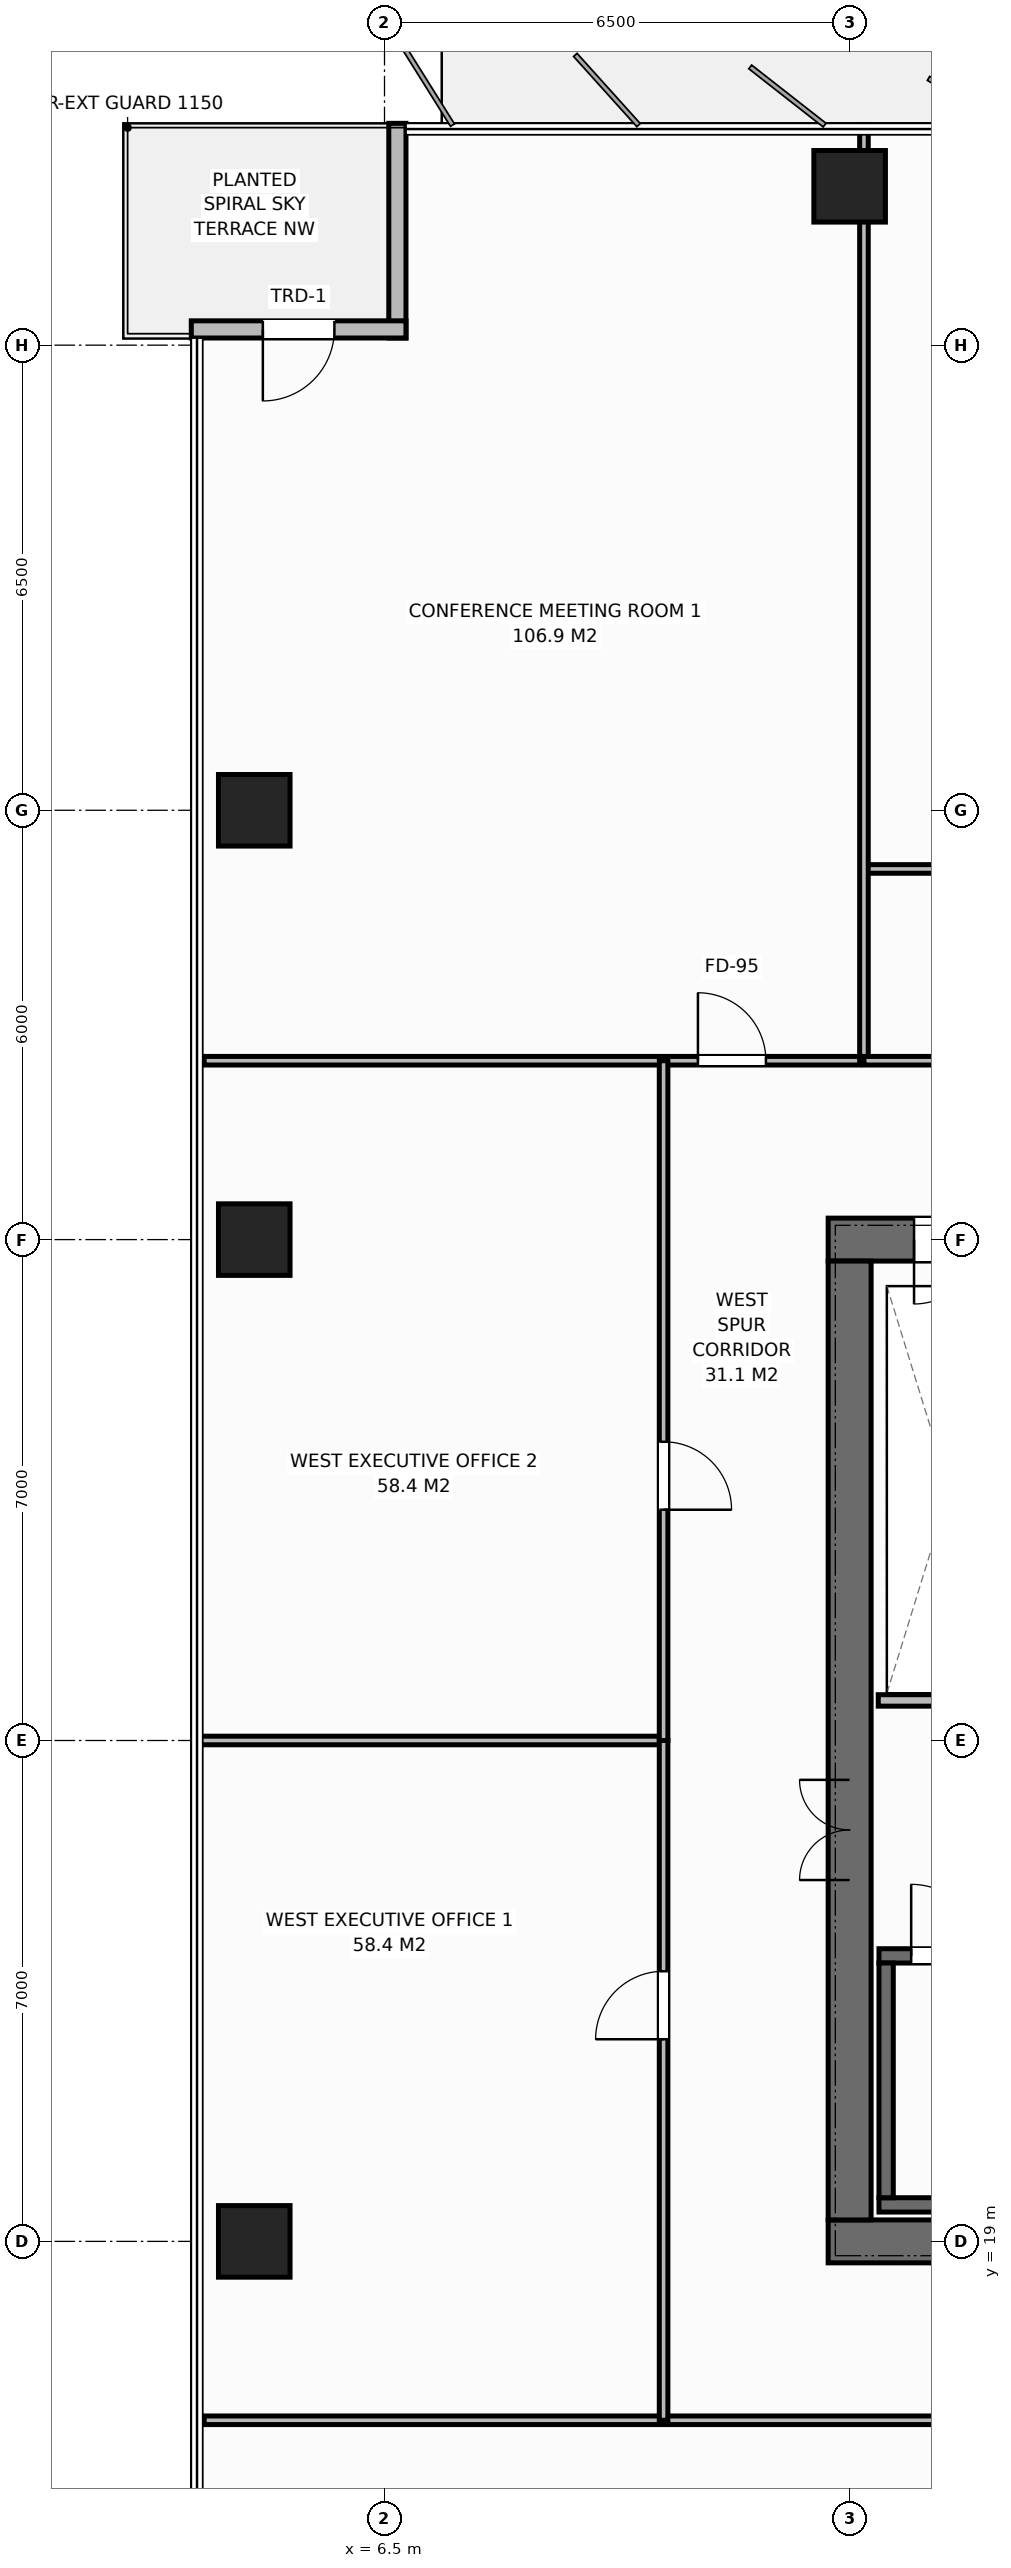
"""IFC4 building model, lengths in metres.
Left out: names, types, materials, properties, quantities, classifications, styles, units other than length and angle.
Written with IfcOpenShell. Run it as: python <this file> out.ifc"""

import sys

from ifc_helpers import new_model, si_unit, direction, frame, frame_2d, origin, origin_2d, place, context, subcontext, project, spatial, rectangle, extrude, element, fill, save


model = new_model("IFC4")
c1 = context("Model", 3, precision=1e-05, world=origin(), true_north=direction((0.0, 1.0)))
c2 = subcontext(c1, "Body", "Model", "MODEL_VIEW")
j1 = project(units=[si_unit("LENGTHUNIT", "METRE"), si_unit("PLANEANGLEUNIT", "RADIAN")], contexts=[c1])
p1 = place(None, origin())
s1 = spatial("IfcSite", under=j1, at=p1, CompositionType="ELEMENT")
p2 = place(p1, origin())
s2 = spatial("IfcBuilding", under=s1, at=p2, CompositionType="ELEMENT")
p3 = place(p2, frame((0.0, 0.0, 144.2)))
s3 = spatial("IfcBuildingStorey", under=s2, at=p3, CompositionType="ELEMENT", Elevation=144.2)
p4 = place(p3, frame((12.7, 19.0, 0.0), z_axis=(0.0, 0.0, 1.0), x_axis=(1.0, 0.0, 0.0)))
e1 = element("IfcWall", 1, at=p4, inside=s3, PredefinedType="SHEAR", context=c2, shape_type="SweptSolid", body=[
    extrude(rectangle(XDim=13.6, YDim=0.6, at=frame_2d((6.8, 0.0))), origin(), (0.0, 0.0, 1.0), 3.8),
])
p5 = place(p4, frame((9.18, 0.0, 0.0)))
e2 = element("IfcOpeningElement", 2, at=p5, cuts=e1, PredefinedType="OPENING", context=c2, shape_type="SweptSolid", body=[
    extrude(rectangle(XDim=1.4, YDim=2.2, at=frame_2d((0.7, 1.1))), frame((0.0, 0.31, 0.0), z_axis=(0.0, -1.0, 0.0), x_axis=(1.0, 0.0, 0.0)), (0.0, 0.0, 1.0), 0.62),
])
p6 = place(p3, frame((12.7, 33.0, 0.0), z_axis=(0.0, 0.0, 1.0), x_axis=(1.0, 0.0, 0.0)))
e3 = element("IfcWall", 3, at=p6, inside=s3, PredefinedType="SHEAR", context=c2, shape_type="SweptSolid", body=[
    extrude(rectangle(XDim=13.6, YDim=0.6, at=frame_2d((6.8, 0.0))), origin(), (0.0, 0.0, 1.0), 3.8),
])
p7 = place(p6, frame((1.2, 0.0, 0.0)))
e4 = element("IfcOpeningElement", 4, at=p7, cuts=e3, PredefinedType="OPENING", context=c2, shape_type="SweptSolid", body=[
    extrude(rectangle(XDim=0.9, YDim=2.15, at=frame_2d((0.45, 1.075))), frame((0.0, 0.31, 0.0), z_axis=(0.0, -1.0, 0.0), x_axis=(1.0, 0.0, 0.0)), (0.0, 0.0, 1.0), 0.62),
])
p8 = place(p6, frame((3.1, 0.0, 0.0)))
e5 = element("IfcOpeningElement", 5, at=p8, cuts=e3, PredefinedType="OPENING", context=c2, shape_type="SweptSolid", body=[
    extrude(rectangle(XDim=0.9, YDim=2.15, at=frame_2d((0.45, 1.075))), frame((0.0, 0.31, 0.0), z_axis=(0.0, -1.0, 0.0), x_axis=(1.0, 0.0, 0.0)), (0.0, 0.0, 1.0), 0.62),
])
p9 = place(p6, frame((4.9, 0.0, 0.0)))
e6 = element("IfcOpeningElement", 6, at=p9, cuts=e3, PredefinedType="OPENING", context=c2, shape_type="SweptSolid", body=[
    extrude(rectangle(XDim=0.9, YDim=2.15, at=frame_2d((0.45, 1.075))), frame((0.0, 0.31, 0.0), z_axis=(0.0, -1.0, 0.0), x_axis=(1.0, 0.0, 0.0)), (0.0, 0.0, 1.0), 0.62),
])
p10 = place(p6, frame((6.8, 0.0, 0.0)))
e7 = element("IfcOpeningElement", 7, at=p10, cuts=e3, PredefinedType="OPENING", context=c2, shape_type="SweptSolid", body=[
    extrude(rectangle(XDim=0.9, YDim=2.15, at=frame_2d((0.45, 1.075))), frame((0.0, 0.31, 0.0), z_axis=(0.0, -1.0, 0.0), x_axis=(1.0, 0.0, 0.0)), (0.0, 0.0, 1.0), 0.62),
])
p11 = place(p6, frame((9.18, 0.0, 0.0)))
e8 = element("IfcOpeningElement", 8, at=p11, cuts=e3, PredefinedType="OPENING", context=c2, shape_type="SweptSolid", body=[
    extrude(rectangle(XDim=1.4, YDim=2.2, at=frame_2d((0.7, 1.1))), frame((0.0, 0.31, 0.0), z_axis=(0.0, -1.0, 0.0), x_axis=(1.0, 0.0, 0.0)), (0.0, 0.0, 1.0), 0.62),
])
p12 = place(p3, frame((13.0, 19.3, 0.0), z_axis=(0.0, 0.0, 1.0), x_axis=(0.0, 1.0, 0.0)))
e9 = element("IfcWall", 9, at=p12, inside=s3, PredefinedType="SHEAR", context=c2, shape_type="SweptSolid", body=[
    extrude(rectangle(XDim=13.4, YDim=0.6, at=frame_2d((6.7, 0.0))), origin(), (0.0, 0.0, 1.0), 3.8),
])
p13 = place(p12, frame((4.75, 0.0, 0.0)))
e10 = element("IfcOpeningElement", 10, at=p13, cuts=e9, PredefinedType="OPENING", context=c2, shape_type="SweptSolid", body=[
    extrude(rectangle(XDim=1.4, YDim=2.2, at=frame_2d((0.7, 1.1))), frame((0.0, 0.31, 0.0), z_axis=(0.0, -1.0, 0.0), x_axis=(1.0, 0.0, 0.0)), (0.0, 0.0, 1.0), 0.62),
])
p14 = place(p3, frame((13.41, 19.51, 0.0), z_axis=(0.0, 0.0, 1.0), x_axis=(1.0, 0.0, 0.0)))
e11 = element("IfcWall", 11, at=p14, inside=s3, PredefinedType="SHEAR", context=c2, shape_type="SweptSolid", body=[
    extrude(rectangle(XDim=8.43, YDim=0.2, at=frame_2d((4.215, 0.0))), origin(), (0.0, 0.0, 1.0), 3.8),
])
p15 = place(p3, frame((13.41, 22.99, 0.0), z_axis=(0.0, 0.0, 1.0), x_axis=(1.0, 0.0, 0.0)))
e12 = element("IfcWall", 12, at=p15, inside=s3, PredefinedType="SHEAR", context=c2, shape_type="SweptSolid", body=[
    extrude(rectangle(XDim=8.43, YDim=0.2, at=frame_2d((4.215, 0.0))), origin(), (0.0, 0.0, 1.0), 3.8),
])
p16 = place(p15, frame((0.45, 0.0, 0.0)))
e13 = element("IfcOpeningElement", 13, at=p16, cuts=e12, PredefinedType="OPENING", context=c2, shape_type="SweptSolid", body=[
    extrude(rectangle(XDim=1.0, YDim=2.15, at=frame_2d((0.5, 1.075))), frame((0.0, 0.11, 0.0), z_axis=(0.0, -1.0, 0.0), x_axis=(1.0, 0.0, 0.0)), (0.0, 0.0, 1.0), 0.22),
])
p17 = place(p3, frame((13.51, 19.61, 0.0), z_axis=(0.0, 0.0, 1.0), x_axis=(0.0, 1.0, 0.0)))
e14 = element("IfcWall", 14, at=p17, inside=s3, PredefinedType="SHEAR", context=c2, shape_type="SweptSolid", body=[
    extrude(rectangle(XDim=3.28, YDim=0.2, at=frame_2d((1.64, 0.0))), origin(), (0.0, 0.0, 1.0), 3.8),
])
for number, where, z_axis, x_axis in (
    (15, (13.0, 47.72, 0.0), (0.0, 0.0, 1.0), (1.0, 0.0, 0.0)),
    (16, (4.68, 19.0, 0.0), (0.0, 0.0, 1.0), (1.0, 0.0, 0.0)),
    (17, (4.68, 33.0, 0.0), (0.0, 0.0, 1.0), (1.0, 0.0, 0.0)),
    (18, (4.68, 39.0, 0.0), (0.0, 0.0, 1.0), (1.0, 0.0, 0.0)),
):
    element("IfcColumn", number, at=place(p3, frame(where, z_axis=z_axis, x_axis=x_axis)), inside=s3, PredefinedType="COLUMN", context=c2, shape_type="SweptSolid", body=[
        extrude(rectangle(XDim=1.0, YDim=1.0, at=origin_2d()), origin(), (0.0, 0.0, 1.0), 3.8),
    ])
p18 = place(p3, frame((6.68, 45.6, 0.0), z_axis=(0.0, 0.0, 1.0), x_axis=(0.0, 1.0, 0.0)))
e19 = element("IfcWall", 19, at=p18, inside=s3, PredefinedType="STANDARD", context=c2, shape_type="SweptSolid", body=[
    extrude(rectangle(XDim=3.0, YDim=0.24, at=frame_2d((1.5, 0.0))), origin(), (0.0, 0.0, 1.0), 3.572),
])
p19 = place(p3, frame((3.8, 45.72, 0.0), z_axis=(0.0, 0.0, 1.0), x_axis=(1.0, 0.0, 0.0)))
e20 = element("IfcWall", 20, at=p19, inside=s3, PredefinedType="STANDARD", context=c2, shape_type="SweptSolid", body=[
    extrude(rectangle(XDim=3.0, YDim=0.24, at=frame_2d((1.5, 0.0))), origin(), (0.0, 0.0, 1.0), 3.572),
])
p20 = place(p19, frame((1.0, 0.0, 0.0)))
e21 = element("IfcOpeningElement", 21, at=p20, cuts=e20, PredefinedType="OPENING", context=c2, shape_type="SweptSolid", body=[
    extrude(rectangle(XDim=1.0, YDim=2.2, at=frame_2d((0.5, 1.1))), frame((0.0, 0.13, 0.0), z_axis=(0.0, -1.0, 0.0), x_axis=(1.0, 0.0, 0.0)), (0.0, 0.0, 1.0), 0.26),
])
p21 = place(p3, frame((13.4, 26.56, 0.0), z_axis=(0.0, 0.0, 1.0), x_axis=(1.0, 0.0, 0.0)))
e22 = element("IfcWall", 22, at=p21, inside=s3, PredefinedType="STANDARD", context=c2, shape_type="SweptSolid", body=[
    extrude(rectangle(XDim=8.34, YDim=0.16, at=frame_2d((4.17, 0.0))), origin(), (0.0, 0.0, 1.0), 3.572),
])
p22 = place(p3, frame((13.2, 35.5, 0.0), z_axis=(0.0, 0.0, 1.0), x_axis=(1.0, 0.0, 0.0)))
e23 = element("IfcWall", 23, at=p22, inside=s3, PredefinedType="PARTITIONING", context=c2, shape_type="SweptSolid", body=[
    extrude(rectangle(XDim=13.16, YDim=0.12, at=frame_2d((6.58, 0.0))), origin(), (0.0, 0.0, 1.0), 3.572),
])
p23 = place(p22, frame((1.35, 0.0, 0.0)))
e24 = element("IfcOpeningElement", 24, at=p23, cuts=e23, PredefinedType="OPENING", context=c2, shape_type="SweptSolid", body=[
    extrude(rectangle(XDim=0.9, YDim=2.15, at=frame_2d((0.45, 1.075))), frame((0.0, 0.07, 0.0), z_axis=(0.0, -1.0, 0.0), x_axis=(1.0, 0.0, 0.0)), (0.0, 0.0, 1.0), 0.14),
])
p24 = place(p22, frame((4.05, 0.0, 0.0)))
e25 = element("IfcOpeningElement", 25, at=p24, cuts=e23, PredefinedType="OPENING", context=c2, shape_type="SweptSolid", body=[
    extrude(rectangle(XDim=0.9, YDim=2.15, at=frame_2d((0.45, 1.075))), frame((0.0, 0.07, 0.0), z_axis=(0.0, -1.0, 0.0), x_axis=(1.0, 0.0, 0.0)), (0.0, 0.0, 1.0), 0.14),
])
p25 = place(p22, frame((8.25, 0.0, 0.0)))
e26 = element("IfcOpeningElement", 26, at=p25, cuts=e23, PredefinedType="OPENING", context=c2, shape_type="SweptSolid", body=[
    extrude(rectangle(XDim=0.9, YDim=2.15, at=frame_2d((0.45, 1.075))), frame((0.0, 0.07, 0.0), z_axis=(0.0, -1.0, 0.0), x_axis=(1.0, 0.0, 0.0)), (0.0, 0.0, 1.0), 0.14),
])
p26 = place(p22, frame((11.0, 0.0, 0.0)))
e27 = element("IfcOpeningElement", 27, at=p26, cuts=e23, PredefinedType="OPENING", context=c2, shape_type="SweptSolid", body=[
    extrude(rectangle(XDim=0.95, YDim=2.15, at=frame_2d((0.475, 1.075))), frame((0.0, 0.07, 0.0), z_axis=(0.0, -1.0, 0.0), x_axis=(1.0, 0.0, 0.0)), (0.0, 0.0, 1.0), 0.14),
])
p27 = place(p3, frame((13.2, 38.18, 0.0), z_axis=(0.0, 0.0, 1.0), x_axis=(1.0, 0.0, 0.0)))
e28 = element("IfcWall", 28, at=p27, inside=s3, PredefinedType="PARTITIONING", context=c2, shape_type="SweptSolid", body=[
    extrude(rectangle(XDim=13.16, YDim=0.12, at=frame_2d((6.58, 0.0))), origin(), (0.0, 0.0, 1.0), 3.572),
])
p28 = place(p3, frame((13.2, 35.56, 0.0), z_axis=(0.0, 0.0, 1.0), x_axis=(0.0, 1.0, 0.0)))
e29 = element("IfcWall", 29, at=p28, inside=s3, PredefinedType="PARTITIONING", context=c2, shape_type="SweptSolid", body=[
    extrude(rectangle(XDim=13.02, YDim=0.12, at=frame_2d((6.51, 0.0))), origin(), (0.0, 0.0, 1.0), 3.022),
])
p29 = place(p3, frame((3.98, 35.5, 0.0), z_axis=(0.0, 0.0, 1.0), x_axis=(1.0, 0.0, 0.0)))
e30 = element("IfcWall", 30, at=p29, inside=s3, PredefinedType="PARTITIONING", context=c2, shape_type="SweptSolid", body=[
    extrude(rectangle(XDim=9.16, YDim=0.12, at=frame_2d((4.58, 0.0))), origin(), (0.0, 0.0, 1.0), 3.572),
])
p30 = place(p29, frame((6.9, 0.0, 0.0)))
e31 = element("IfcOpeningElement", 31, at=p30, cuts=e30, PredefinedType="OPENING", context=c2, shape_type="SweptSolid", body=[
    extrude(rectangle(XDim=0.95, YDim=2.15, at=frame_2d((0.475, 1.075))), frame((0.0, 0.07, 0.0), z_axis=(0.0, -1.0, 0.0), x_axis=(1.0, 0.0, 0.0)), (0.0, 0.0, 1.0), 0.14),
])
p31 = place(p3, frame((3.98, 16.5, 0.0), z_axis=(0.0, 0.0, 1.0), x_axis=(1.0, 0.0, 0.0)))
e32 = element("IfcWall", 32, at=p31, inside=s3, PredefinedType="PARTITIONING", context=c2, shape_type="SweptSolid", body=[
    extrude(rectangle(XDim=15.02, YDim=0.12, at=frame_2d((7.51, 0.0))), origin(), (0.0, 0.0, 1.0), 3.572),
])
p32 = place(p31, frame((10.245, 0.0, 0.0)))
e33 = element("IfcOpeningElement", 33, at=p32, cuts=e32, PredefinedType="OPENING", context=c2, shape_type="SweptSolid", body=[
    extrude(rectangle(XDim=0.95, YDim=2.15, at=frame_2d((0.475, 1.075))), frame((0.0, 0.07, 0.0), z_axis=(0.0, -1.0, 0.0), x_axis=(1.0, 0.0, 0.0)), (0.0, 0.0, 1.0), 0.14),
])
p33 = place(p3, frame((3.82, 26.0, 0.0), z_axis=(0.0, 0.0, 1.0), x_axis=(1.0, 0.0, 0.0)))
e34 = element("IfcWall", 34, at=p33, inside=s3, PredefinedType="PARTITIONING", context=c2, shape_type="SweptSolid", body=[
    extrude(rectangle(XDim=6.58, YDim=0.12, at=frame_2d((3.29, 0.0))), origin(), (0.0, 0.0, 1.0), 3.572),
])
p34 = place(p3, frame((10.4, 16.5, 0.0), z_axis=(0.0, 0.0, 1.0), x_axis=(0.0, 1.0, 0.0)))
e35 = element("IfcWall", 35, at=p34, inside=s3, PredefinedType="PARTITIONING", context=c2, shape_type="SweptSolid", body=[
    extrude(rectangle(XDim=9.5, YDim=0.12, at=frame_2d((4.75, 0.0))), origin(), (0.0, 0.0, 1.0), 3.572),
])
p35 = place(p34, frame((5.325, 0.0, 0.0)))
e36 = element("IfcOpeningElement", 36, at=p35, cuts=e35, PredefinedType="OPENING", context=c2, shape_type="SweptSolid", body=[
    extrude(rectangle(XDim=0.95, YDim=2.15, at=frame_2d((0.475, 1.075))), frame((0.0, 0.07, 0.0), z_axis=(0.0, -1.0, 0.0), x_axis=(1.0, 0.0, 0.0)), (0.0, 0.0, 1.0), 0.14),
])
p36 = place(p3, frame((10.4, 26.0, 0.0), z_axis=(0.0, 0.0, 1.0), x_axis=(0.0, 1.0, 0.0)))
e37 = element("IfcWall", 37, at=p36, inside=s3, PredefinedType="PARTITIONING", context=c2, shape_type="SweptSolid", body=[
    extrude(rectangle(XDim=9.5, YDim=0.12, at=frame_2d((4.75, 0.0))), origin(), (0.0, 0.0, 1.0), 3.572),
])
p37 = place(p36, frame((3.225, 0.0, 0.0)))
e38 = element("IfcOpeningElement", 38, at=p37, cuts=e37, PredefinedType="OPENING", context=c2, shape_type="SweptSolid", body=[
    extrude(rectangle(XDim=0.95, YDim=2.15, at=frame_2d((0.475, 1.075))), frame((0.0, 0.07, 0.0), z_axis=(0.0, -1.0, 0.0), x_axis=(1.0, 0.0, 0.0)), (0.0, 0.0, 1.0), 0.14),
])
p38 = place(p20, origin())
e39 = element("IfcDoor", 39, at=p38, inside=s3, OperationType="SINGLE_SWING_RIGHT", PredefinedType="DOOR", context=c2, shape_type="SweptSolid", body=[
    extrude(rectangle(XDim=1.0, YDim=2.2, at=frame_2d((0.5, 1.1))), frame((0.0, 0.025, 0.0), z_axis=(0.0, -1.0, 0.0), x_axis=(1.0, 0.0, 0.0)), (0.0, 0.0, 1.0), 0.05),
])
fill(e21, e39)
p39 = place(p16, origin())
e40 = element("IfcDoor", 40, at=p39, inside=s3, OperationType="SINGLE_SWING_LEFT", PredefinedType="DOOR", context=c2, shape_type="SweptSolid", body=[
    extrude(rectangle(XDim=1.0, YDim=2.15, at=frame_2d((0.5, 1.075))), frame((0.0, 0.025, 0.0), z_axis=(0.0, -1.0, 0.0), x_axis=(1.0, 0.0, 0.0)), (0.0, 0.0, 1.0), 0.05),
])
fill(e13, e40)
p40 = place(p13, origin())
e41 = element("IfcDoor", 41, at=p40, inside=s3, OperationType="DOUBLE_DOOR_SINGLE_SWING", PredefinedType="DOOR", context=c2, shape_type="SweptSolid", body=[
    extrude(rectangle(XDim=1.4, YDim=2.2, at=frame_2d((0.7, 1.1))), frame((0.0, 0.025, 0.0), z_axis=(0.0, -1.0, 0.0), x_axis=(1.0, 0.0, 0.0)), (0.0, 0.0, 1.0), 0.05),
])
fill(e10, e41)
p41 = place(p7, origin())
e42 = element("IfcDoor", 42, at=p41, inside=s3, OperationType="SINGLE_SWING_RIGHT", PredefinedType="DOOR", context=c2, shape_type="SweptSolid", body=[
    extrude(rectangle(XDim=0.9, YDim=2.15, at=frame_2d((0.45, 1.075))), frame((0.0, -0.025, 0.0), z_axis=(0.0, -1.0, 0.0), x_axis=(1.0, 0.0, 0.0)), (0.0, 0.0, 1.0), 0.05),
])
fill(e4, e42)
p42 = place(p30, origin())
e43 = element("IfcDoor", 43, at=p42, inside=s3, OperationType="SINGLE_SWING_LEFT", PredefinedType="DOOR", context=c2, shape_type="SweptSolid", body=[
    extrude(rectangle(XDim=0.95, YDim=2.15, at=frame_2d((0.475, 1.075))), frame((0.0, 0.025, 0.0), z_axis=(0.0, -1.0, 0.0), x_axis=(1.0, 0.0, 0.0)), (0.0, 0.0, 1.0), 0.05),
])
fill(e31, e43)
p43 = place(p35, origin())
e44 = element("IfcDoor", 44, at=p43, inside=s3, OperationType="SINGLE_SWING_LEFT", PredefinedType="DOOR", context=c2, shape_type="SweptSolid", body=[
    extrude(rectangle(XDim=0.95, YDim=2.15, at=frame_2d((0.475, 1.075))), frame((0.0, 0.025, 0.0), z_axis=(0.0, -1.0, 0.0), x_axis=(1.0, 0.0, 0.0)), (0.0, 0.0, 1.0), 0.05),
])
fill(e36, e44)
p44 = place(p37, origin())
e45 = element("IfcDoor", 45, at=p44, inside=s3, OperationType="SINGLE_SWING_RIGHT", PredefinedType="DOOR", context=c2, shape_type="SweptSolid", body=[
    extrude(rectangle(XDim=0.95, YDim=2.15, at=frame_2d((0.475, 1.075))), frame((0.0, 0.025, 0.0), z_axis=(0.0, -1.0, 0.0), x_axis=(1.0, 0.0, 0.0)), (0.0, 0.0, 1.0), 0.05),
])
fill(e38, e45)
save(model, sys.argv[1])
